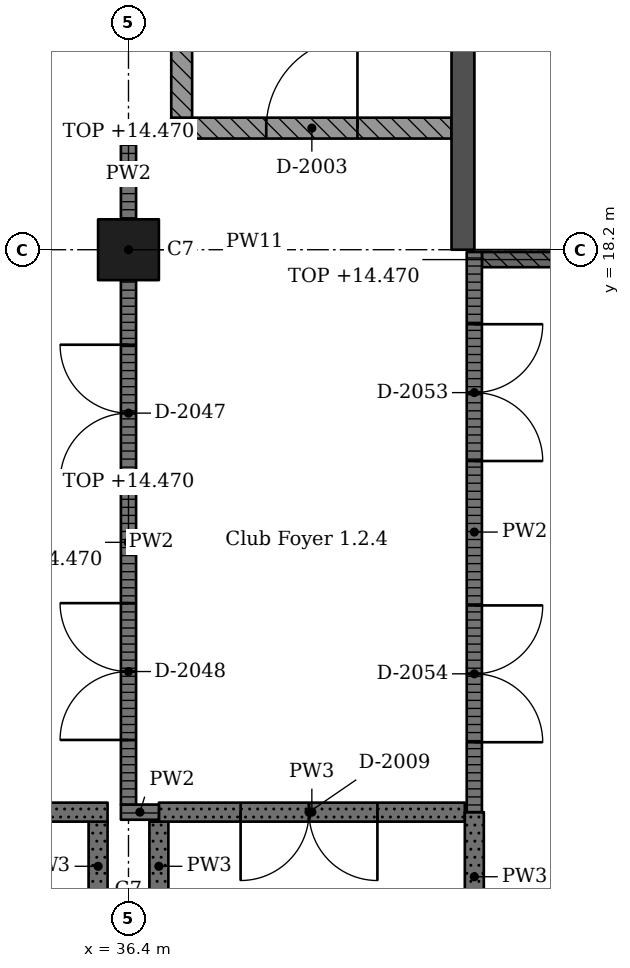
"""IFC4 building model, lengths in metres.
Left out: names, types, materials, properties, quantities, classifications, styles, units other than length and angle.
Written with IfcOpenShell. Run it as: python <this file> out.ifc"""

import sys

from ifc_helpers import new_model, si_unit, direction, frame, frame_2d, origin, origin_2d, place, context, subcontext, project, spatial, rectangle, extrude, element, fill, save


model = new_model("IFC4")
c1 = context("Model", 3, precision=1e-05, world=origin(), true_north=direction((0.0, 1.0)))
c2 = subcontext(c1, "Body", "Model", "MODEL_VIEW")
j1 = project(units=[si_unit("LENGTHUNIT", "METRE"), si_unit("PLANEANGLEUNIT", "RADIAN")], contexts=[c1])
p1 = place(None, origin())
s1 = spatial("IfcSite", under=j1, at=p1, CompositionType="ELEMENT")
p2 = place(p1, origin())
s2 = spatial("IfcBuilding", under=s1, at=p2, CompositionType="ELEMENT")
p3 = place(p2, frame((0.0, 0.0, 10.92)))
s3 = spatial("IfcBuildingStorey", under=s2, at=p3, CompositionType="ELEMENT", Elevation=10.92)
p4 = place(p3, frame((36.4, 18.2, 0.0), z_axis=(0.0, 0.0, 1.0), x_axis=(1.0, 0.0, 0.0)))
e1 = element("IfcColumn", 1, at=p4, inside=s3, PredefinedType="COLUMN", context=c2, shape_type="SweptSolid", body=[
    extrude(rectangle(XDim=0.8, YDim=0.8, at=origin_2d()), origin(), (0.0, 0.0, 1.0), 4.55),
])
p5 = place(p3, frame((40.8, 40.95, 0.0), z_axis=(0.0, 0.0, 1.0), x_axis=(0.0, -1.0, 0.0)))
e2 = element("IfcWall", 2, at=p5, inside=s3, PredefinedType="SHEAR", context=c2, shape_type="SweptSolid", body=[
    extrude(rectangle(XDim=22.75, YDim=0.3, at=frame_2d((11.375, 0.0))), origin(), (0.0, 0.0, 1.0), 4.55),
])
p6 = place(p3, frame((36.0, 9.5, 0.0), z_axis=(0.0, 0.0, 1.0), x_axis=(0.0, 1.0, 0.0)))
e3 = element("IfcWall", 3, at=p6, inside=s3, PredefinedType="SOLIDWALL", context=c2, shape_type="SweptSolid", body=[
    extrude(rectangle(XDim=1.175, YDim=0.25, at=frame_2d((0.587, 0.0))), origin(), (0.0, 0.0, 1.0), 4.25),
])
p7 = place(p3, frame((36.125, 10.8, 0.0), z_axis=(0.0, 0.0, 1.0), x_axis=(-1.0, 0.0, 0.0)))
e4 = element("IfcWall", 4, at=p7, inside=s3, PredefinedType="SOLIDWALL", context=c2, shape_type="SweptSolid", body=[
    extrude(rectangle(XDim=2.825, YDim=0.25, at=frame_2d((1.413, 0.0))), origin(), (0.0, 0.0, 1.0), 4.25),
])
p8 = place(p3, frame((36.3, 10.8, 0.0), z_axis=(0.0, 0.0, 1.0), x_axis=(1.0, 0.0, 0.0)))
e5 = element("IfcWall", 5, at=p8, inside=s3, PredefinedType="PARTITIONING", context=c2, shape_type="SweptSolid", body=[
    extrude(rectangle(XDim=0.5, YDim=0.2, at=frame_2d((0.25, 0.0))), origin(), (0.0, 0.0, 1.0), 4.25),
])
p9 = place(p3, frame((36.4, 17.8, 0.0), z_axis=(0.0, 0.0, 1.0), x_axis=(0.0, -1.0, 0.0)))
e6 = element("IfcWall", 6, at=p9, inside=s3, PredefinedType="PARTITIONING", context=c2, shape_type="SweptSolid", body=[
    extrude(rectangle(XDim=6.9, YDim=0.2, at=frame_2d((3.45, 0.0))), origin(), (0.0, 0.0, 1.0), 3.55),
])
p10 = place(p9, frame((0.85, 0.0, 0.0)))
e7 = element("IfcOpeningElement", 7, at=p10, cuts=e6, PredefinedType="OPENING", context=c2, shape_type="SweptSolid", body=[
    extrude(rectangle(XDim=1.8, YDim=2.4, at=frame_2d((0.9, 1.2))), frame((0.0, 0.11, 0.0), z_axis=(0.0, -1.0, 0.0), x_axis=(1.0, 0.0, 0.0)), (0.0, 0.0, 1.0), 0.22),
])
p11 = place(p9, frame((4.25, 0.0, 0.0)))
e8 = element("IfcOpeningElement", 8, at=p11, cuts=e6, PredefinedType="OPENING", context=c2, shape_type="SweptSolid", body=[
    extrude(rectangle(XDim=1.8, YDim=2.4, at=frame_2d((0.9, 1.2))), frame((0.0, 0.11, 0.0), z_axis=(0.0, -1.0, 0.0), x_axis=(1.0, 0.0, 0.0)), (0.0, 0.0, 1.0), 0.22),
])
p12 = place(p3, frame((36.4, 19.8, 0.0), z_axis=(0.0, 0.0, 1.0), x_axis=(0.0, -1.0, 0.0)))
e9 = element("IfcWall", 9, at=p12, inside=s3, PredefinedType="PARTITIONING", context=c2, shape_type="SweptSolid", body=[
    extrude(rectangle(XDim=1.2, YDim=0.2, at=frame_2d((0.6, 0.0))), origin(), (0.0, 0.0, 1.0), 3.55),
])
p13 = place(p3, frame((36.8, 10.675, 0.0), z_axis=(0.0, 0.0, 1.0), x_axis=(0.0, -1.0, 0.0)))
e10 = element("IfcWall", 10, at=p13, inside=s3, PredefinedType="SOLIDWALL", context=c2, shape_type="SweptSolid", body=[
    extrude(rectangle(XDim=1.175, YDim=0.25, at=frame_2d((0.587, 0.0))), origin(), (0.0, 0.0, 1.0), 4.25),
])
p14 = place(p3, frame((36.962, 19.8, 0.0), z_axis=(0.0, 0.0, 1.0), x_axis=(1.0, 0.0, 0.0)))
e11 = element("IfcWall", 11, at=p14, inside=s3, PredefinedType="SOLIDWALL", context=c2, shape_type="SweptSolid", body=[
    extrude(rectangle(XDim=3.688, YDim=0.275, at=frame_2d((1.844, 0.0))), origin(), (0.0, 0.0, 1.0), 4.25),
])
p15 = place(p14, frame((1.25, 0.0, 0.0)))
e12 = element("IfcOpeningElement", 12, at=p15, cuts=e11, PredefinedType="OPENING", context=c2, shape_type="SweptSolid", body=[
    extrude(rectangle(XDim=1.2, YDim=2.4, at=frame_2d((0.6, 1.2))), frame((0.0, 0.147, 0.0), z_axis=(0.0, -1.0, 0.0), x_axis=(1.0, 0.0, 0.0)), (0.0, 0.0, 1.0), 0.295),
])
p16 = place(p3, frame((37.1, 26.788, 0.0), z_axis=(0.0, 0.0, 1.0), x_axis=(0.0, -1.0, 0.0)))
e13 = element("IfcWall", 13, at=p16, inside=s3, PredefinedType="SOLIDWALL", context=c2, shape_type="SweptSolid", body=[
    extrude(rectangle(XDim=6.85, YDim=0.275, at=frame_2d((3.425, 0.0))), origin(), (0.0, 0.0, 1.0), 4.25),
])
p17 = place(p3, frame((40.825, 10.8, 0.0), z_axis=(0.0, 0.0, 1.0), x_axis=(-1.0, 0.0, 0.0)))
e14 = element("IfcWall", 14, at=p17, inside=s3, PredefinedType="SOLIDWALL", context=c2, shape_type="SweptSolid", body=[
    extrude(rectangle(XDim=4.025, YDim=0.25, at=frame_2d((2.012, 0.0))), origin(), (0.0, 0.0, 1.0), 4.25),
])
p18 = place(p17, frame((1.15, 0.0, 0.0)))
e15 = element("IfcOpeningElement", 15, at=p18, cuts=e14, PredefinedType="OPENING", context=c2, shape_type="SweptSolid", body=[
    extrude(rectangle(XDim=1.8, YDim=2.1, at=frame_2d((0.9, 1.05))), frame((0.0, 0.135, 0.0), z_axis=(0.0, -1.0, 0.0), x_axis=(1.0, 0.0, 0.0)), (0.0, 0.0, 1.0), 0.27),
])
p19 = place(p3, frame((40.95, 10.8, 0.0), z_axis=(0.0, 0.0, 1.0), x_axis=(0.0, -1.0, 0.0)))
e16 = element("IfcWall", 16, at=p19, inside=s3, PredefinedType="SOLIDWALL", context=c2, shape_type="SweptSolid", body=[
    extrude(rectangle(XDim=1.7, YDim=0.25, at=frame_2d((0.85, 0.0))), origin(), (0.0, 0.0, 1.0), 4.25),
])
p20 = place(p3, frame((40.95, 18.17, 0.0), z_axis=(0.0, 0.0, 1.0), x_axis=(0.0, -1.0, 0.0)))
e17 = element("IfcWall", 17, at=p20, inside=s3, PredefinedType="PARTITIONING", context=c2, shape_type="SweptSolid", body=[
    extrude(rectangle(XDim=7.37, YDim=0.2, at=frame_2d((3.685, 0.0))), origin(), (0.0, 0.0, 1.0), 4.25),
])
p21 = place(p20, frame((0.95, 0.0, 0.0)))
e18 = element("IfcOpeningElement", 18, at=p21, cuts=e17, PredefinedType="OPENING", context=c2, shape_type="SweptSolid", body=[
    extrude(rectangle(XDim=1.8, YDim=2.4, at=frame_2d((0.9, 1.2))), frame((0.0, 0.11, 0.0), z_axis=(0.0, -1.0, 0.0), x_axis=(1.0, 0.0, 0.0)), (0.0, 0.0, 1.0), 0.22),
])
p22 = place(p20, frame((4.65, 0.0, 0.0)))
e19 = element("IfcOpeningElement", 19, at=p22, cuts=e17, PredefinedType="OPENING", context=c2, shape_type="SweptSolid", body=[
    extrude(rectangle(XDim=1.8, YDim=2.4, at=frame_2d((0.9, 1.2))), frame((0.0, 0.11, 0.0), z_axis=(0.0, -1.0, 0.0), x_axis=(1.0, 0.0, 0.0)), (0.0, 0.0, 1.0), 0.22),
])
p23 = place(p3, frame((41.05, 18.07, 0.0), z_axis=(0.0, 0.0, 1.0), x_axis=(1.0, 0.0, 0.0)))
e20 = element("IfcWall", 20, at=p23, inside=s3, PredefinedType="PARTITIONING", context=c2, shape_type="SweptSolid", body=[
    extrude(rectangle(XDim=4.15, YDim=0.2, at=frame_2d((2.075, 0.0))), origin(), (0.0, 0.0, 1.0), 3.55),
])
p24 = place(p23, frame((1.075, 0.0, 1.1)))
e21 = element("IfcOpeningElement", 21, at=p24, cuts=e20, PredefinedType="OPENING", context=c2, shape_type="SweptSolid", body=[
    extrude(rectangle(XDim=2.0, YDim=2.0, at=frame_2d((1.0, 1.0))), frame((0.0, 0.11, 0.0), z_axis=(0.0, -1.0, 0.0), x_axis=(1.0, 0.0, 0.0)), (0.0, 0.0, 1.0), 0.22),
])
p25 = place(p15, origin())
e22 = element("IfcDoor", 22, at=p25, inside=s3, OperationType="SINGLE_SWING_LEFT", PredefinedType="DOOR", context=c2, shape_type="SweptSolid", body=[
    extrude(rectangle(XDim=1.2, YDim=2.4, at=frame_2d((0.6, 1.2))), frame((0.0, 0.025, 0.0), z_axis=(0.0, -1.0, 0.0), x_axis=(1.0, 0.0, 0.0)), (0.0, 0.0, 1.0), 0.05),
])
fill(e12, e22)
p26 = place(p18, origin())
e23 = element("IfcDoor", 23, at=p26, inside=s3, OperationType="DOUBLE_DOOR_SINGLE_SWING", PredefinedType="DOOR", context=c2, shape_type="SweptSolid", body=[
    extrude(rectangle(XDim=1.8, YDim=2.1, at=frame_2d((0.9, 1.05))), frame((0.0, 0.025, 0.0), z_axis=(0.0, -1.0, 0.0), x_axis=(1.0, 0.0, 0.0)), (0.0, 0.0, 1.0), 0.05),
])
fill(e15, e23)
p27 = place(p10, origin())
e24 = element("IfcDoor", 24, at=p27, inside=s3, OperationType="DOUBLE_DOOR_SINGLE_SWING", PredefinedType="DOOR", context=c2, shape_type="SweptSolid", body=[
    extrude(rectangle(XDim=1.8, YDim=2.4, at=frame_2d((0.9, 1.2))), frame((0.0, 0.025, 0.0), z_axis=(0.0, -1.0, 0.0), x_axis=(1.0, 0.0, 0.0)), (0.0, 0.0, 1.0), 0.05),
])
fill(e7, e24)
p28 = place(p11, origin())
e25 = element("IfcDoor", 25, at=p28, inside=s3, OperationType="DOUBLE_DOOR_SINGLE_SWING", PredefinedType="DOOR", context=c2, shape_type="SweptSolid", body=[
    extrude(rectangle(XDim=1.8, YDim=2.4, at=frame_2d((0.9, 1.2))), frame((0.0, 0.025, 0.0), z_axis=(0.0, -1.0, 0.0), x_axis=(1.0, 0.0, 0.0)), (0.0, 0.0, 1.0), 0.05),
])
fill(e8, e25)
p29 = place(p21, origin())
e26 = element("IfcDoor", 26, at=p29, inside=s3, OperationType="DOUBLE_DOOR_SINGLE_SWING", PredefinedType="DOOR", context=c2, shape_type="SweptSolid", body=[
    extrude(rectangle(XDim=1.8, YDim=2.4, at=frame_2d((0.9, 1.2))), frame((0.0, 0.025, 0.0), z_axis=(0.0, -1.0, 0.0), x_axis=(1.0, 0.0, 0.0)), (0.0, 0.0, 1.0), 0.05),
])
fill(e18, e26)
p30 = place(p22, origin())
e27 = element("IfcDoor", 27, at=p30, inside=s3, OperationType="DOUBLE_DOOR_SINGLE_SWING", PredefinedType="DOOR", context=c2, shape_type="SweptSolid", body=[
    extrude(rectangle(XDim=1.8, YDim=2.4, at=frame_2d((0.9, 1.2))), frame((0.0, 0.025, 0.0), z_axis=(0.0, -1.0, 0.0), x_axis=(1.0, 0.0, 0.0)), (0.0, 0.0, 1.0), 0.05),
])
fill(e19, e27)
save(model, sys.argv[1])
